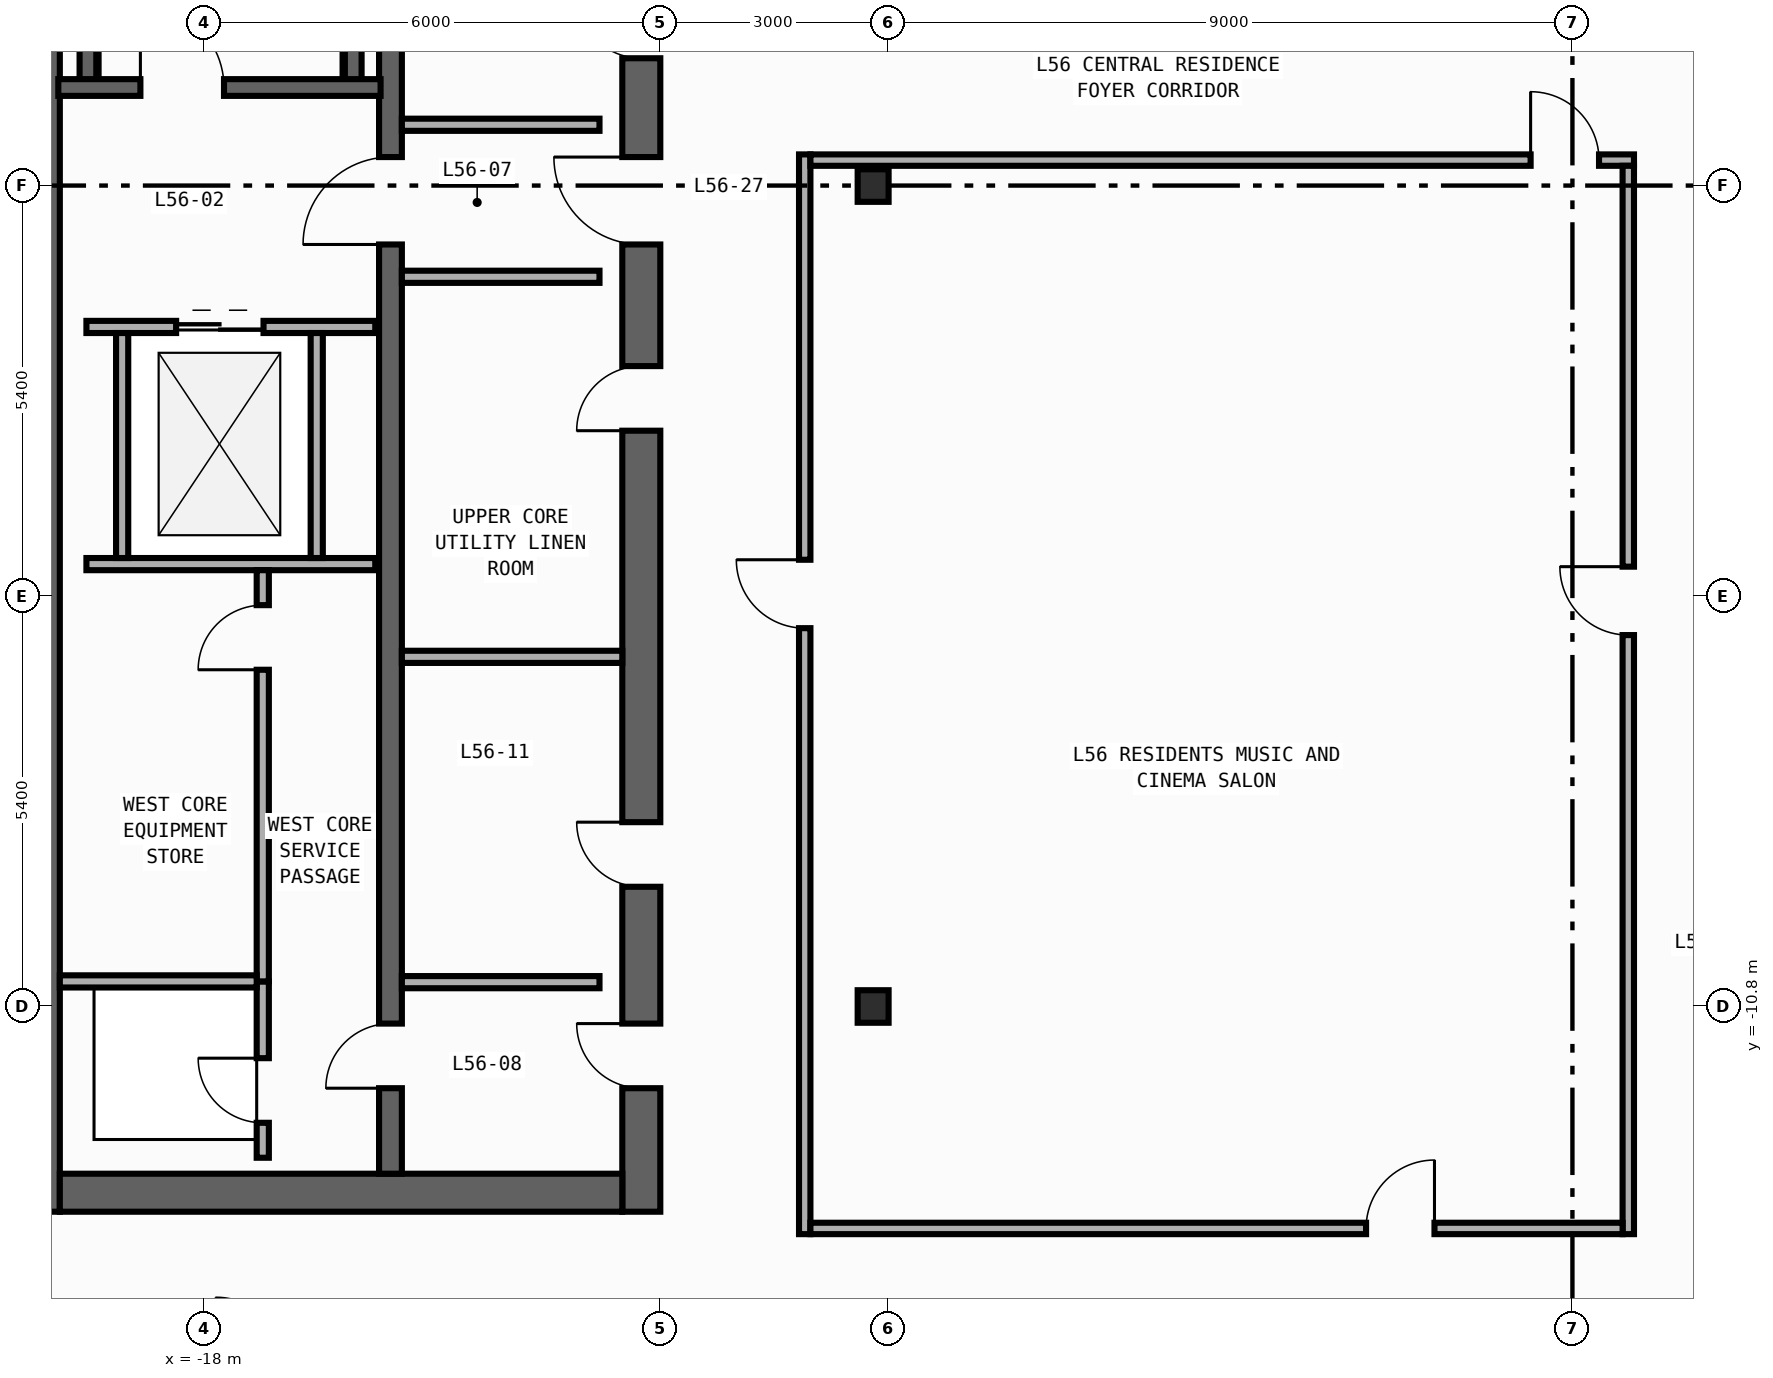
"""IFC4 building model, lengths in metres.
Left out: names, types, materials, properties, quantities, classifications, styles, units other than length and angle.
Written with IfcOpenShell. Run it as: python <this file> out.ifc"""

import sys

from ifc_helpers import new_model, si_unit, direction, frame, frame_2d, origin, origin_2d, place, context, subcontext, project, spatial, rectangle, i_section, extrude, element, fill, save


model = new_model("IFC4")
c1 = context("Model", 3, precision=1e-05, world=origin(), true_north=direction((0.0, 1.0)))
c2 = subcontext(c1, "Body", "Model", "MODEL_VIEW")
j1 = project(units=[si_unit("LENGTHUNIT", "METRE"), si_unit("PLANEANGLEUNIT", "RADIAN")], contexts=[c1])
p1 = place(None, origin())
s1 = spatial("IfcSite", under=j1, at=p1, CompositionType="ELEMENT")
p2 = place(p1, origin())
s2 = spatial("IfcBuilding", under=s1, at=p2, CompositionType="ELEMENT")
p3 = place(p2, frame((0.0, 0.0, 240.4)))
s3 = spatial("IfcBuildingStorey", under=s2, at=p3, CompositionType="ELEMENT", Elevation=240.4)
p4 = place(p3, frame((-20.15, -13.5, 0.0), z_axis=(0.0, 0.0, 1.0), x_axis=(0.0, 1.0, 0.0)))
e1 = element("IfcWall", 1, at=p4, inside=s3, PredefinedType="SHEAR", context=c2, shape_type="SweptSolid", body=[
    extrude(rectangle(XDim=27.0, YDim=0.5, at=frame_2d((13.5, 0.0))), origin(), (0.0, 0.0, 1.0), 3.34),
])
p5 = place(p3, frame((-12.25, -13.5, 0.0), z_axis=(0.0, 0.0, 1.0), x_axis=(0.0, 1.0, 0.0)))
e2 = element("IfcWall", 2, at=p5, inside=s3, PredefinedType="SHEAR", context=c2, shape_type="SweptSolid", body=[
    extrude(rectangle(XDim=27.0, YDim=0.5, at=frame_2d((13.5, 0.0))), origin(), (0.0, 0.0, 1.0), 3.34),
])
p6 = place(p5, frame((15.175, 0.0, 0.0)))
e3 = element("IfcOpeningElement", 3, at=p6, cuts=e2, PredefinedType="OPENING", context=c2, shape_type="SweptSolid", body=[
    extrude(rectangle(XDim=0.85, YDim=2.1, at=frame_2d((0.425, 1.05))), frame((0.0, 0.26, 0.0), z_axis=(0.0, -1.0, 0.0), x_axis=(1.0, 0.0, 0.0)), (0.0, 0.0, 1.0), 0.52),
])
p7 = place(p5, frame((21.275, 0.0, 0.0)))
e4 = element("IfcOpeningElement", 4, at=p7, cuts=e2, PredefinedType="OPENING", context=c2, shape_type="SweptSolid", body=[
    extrude(rectangle(XDim=0.85, YDim=2.1, at=frame_2d((0.425, 1.05))), frame((0.0, 0.26, 0.0), z_axis=(0.0, -1.0, 0.0), x_axis=(1.0, 0.0, 0.0)), (0.0, 0.0, 1.0), 0.52),
])
p8 = place(p5, frame((4.275, 0.0, 0.0)))
e5 = element("IfcOpeningElement", 5, at=p8, cuts=e2, PredefinedType="OPENING", context=c2, shape_type="SweptSolid", body=[
    extrude(rectangle(XDim=0.85, YDim=2.1, at=frame_2d((0.425, 1.05))), frame((0.0, 0.26, 0.0), z_axis=(0.0, -1.0, 0.0), x_axis=(1.0, 0.0, 0.0)), (0.0, 0.0, 1.0), 0.52),
])
p9 = place(p5, frame((10.275, 0.0, 0.0)))
e6 = element("IfcOpeningElement", 6, at=p9, cuts=e2, PredefinedType="OPENING", context=c2, shape_type="SweptSolid", body=[
    extrude(rectangle(XDim=0.85, YDim=2.1, at=frame_2d((0.425, 1.05))), frame((0.0, 0.26, 0.0), z_axis=(0.0, -1.0, 0.0), x_axis=(1.0, 0.0, 0.0)), (0.0, 0.0, 1.0), 0.52),
])
p10 = place(p5, frame((12.725, 0.0, 0.0)))
e7 = element("IfcOpeningElement", 7, at=p10, cuts=e2, PredefinedType="OPENING", context=c2, shape_type="SweptSolid", body=[
    extrude(rectangle(XDim=1.15, YDim=2.2, at=frame_2d((0.575, 1.1))), frame((0.0, 0.26, 0.0), z_axis=(0.0, -1.0, 0.0), x_axis=(1.0, 0.0, 0.0)), (0.0, 0.0, 1.0), 0.52),
])
p11 = place(p5, frame((1.625, 0.0, 0.0)))
e8 = element("IfcOpeningElement", 8, at=p11, cuts=e2, PredefinedType="OPENING", context=c2, shape_type="SweptSolid", body=[
    extrude(rectangle(XDim=0.85, YDim=2.1, at=frame_2d((0.425, 1.05))), frame((0.0, 0.26, 0.0), z_axis=(0.0, -1.0, 0.0), x_axis=(1.0, 0.0, 0.0)), (0.0, 0.0, 1.0), 0.52),
])
p12 = place(p3, frame((-19.9, -13.25, 0.0), z_axis=(0.0, 0.0, 1.0), x_axis=(1.0, 0.0, 0.0)))
e9 = element("IfcWall", 9, at=p12, inside=s3, PredefinedType="SHEAR", context=c2, shape_type="SweptSolid", body=[
    extrude(rectangle(XDim=7.4, YDim=0.5, at=frame_2d((3.7, 0.0))), origin(), (0.0, 0.0, 1.0), 3.34),
])
p13 = place(p3, frame((-15.55, -13.0, 0.0), z_axis=(0.0, 0.0, 1.0), x_axis=(0.0, 1.0, 0.0)))
e10 = element("IfcWall", 10, at=p13, inside=s3, PredefinedType="SHEAR", context=c2, shape_type="SweptSolid", body=[
    extrude(rectangle(XDim=26.0, YDim=0.3, at=frame_2d((13.0, 0.0))), origin(), (0.0, 0.0, 1.0), 3.34),
])
p14 = place(p13, frame((12.225, 0.0, 0.0)))
e11 = element("IfcOpeningElement", 11, at=p14, cuts=e10, PredefinedType="OPENING", context=c2, shape_type="SweptSolid", body=[
    extrude(rectangle(XDim=1.15, YDim=2.2, at=frame_2d((0.575, 1.1))), frame((0.0, 0.16, 0.0), z_axis=(0.0, -1.0, 0.0), x_axis=(1.0, 0.0, 0.0)), (0.0, 0.0, 1.0), 0.32),
])
p15 = place(p13, frame((1.125, 0.0, 0.0)))
e12 = element("IfcOpeningElement", 12, at=p15, cuts=e10, PredefinedType="OPENING", context=c2, shape_type="SweptSolid", body=[
    extrude(rectangle(XDim=0.85, YDim=2.1, at=frame_2d((0.425, 1.05))), frame((0.0, 0.16, 0.0), z_axis=(0.0, -1.0, 0.0), x_axis=(1.0, 0.0, 0.0)), (0.0, 0.0, 1.0), 0.32),
])
for number, where, z_axis, x_axis in (
    (13, (-16.04, 1.29, 0.0), (0.0, 0.0, 1.0), (0.0, 1.0, 0.0)),
    (14, (-19.53, 1.29, 0.0), (0.0, 0.0, 1.0), (0.0, 1.0, 0.0)),
):
    element("IfcWall", number, at=place(p3, frame(where, z_axis=z_axis, x_axis=x_axis)), inside=s3, PredefinedType="SHEAR", context=c2, shape_type="SweptSolid", body=[
        extrude(rectangle(XDim=11.42, YDim=0.22, at=frame_2d((5.71, 0.0))), origin(), (0.0, 0.0, 1.0), 3.34),
    ])
p16 = place(p3, frame((-19.92, 1.29, 0.0), z_axis=(0.0, 0.0, 1.0), x_axis=(1.0, 0.0, 0.0)))
e15 = element("IfcWall", 15, at=p16, inside=s3, PredefinedType="SHEAR", context=c2, shape_type="SweptSolid", body=[
    extrude(rectangle(XDim=4.24, YDim=0.22, at=frame_2d((2.12, 0.0))), origin(), (0.0, 0.0, 1.0), 3.34),
])
p17 = place(p16, frame((1.08, 0.0, 0.0)))
e16 = element("IfcOpeningElement", 16, at=p17, cuts=e15, PredefinedType="OPENING", context=c2, shape_type="SweptSolid", body=[
    extrude(rectangle(XDim=1.1, YDim=2.2, at=frame_2d((0.55, 1.1))), frame((0.0, 0.12, 0.0), z_axis=(0.0, -1.0, 0.0), x_axis=(1.0, 0.0, 0.0)), (0.0, 0.0, 1.0), 0.24),
])
for number, where, z_axis, x_axis in (
    (17, (-9.2, -10.8, 0.0), (0.0, 0.0, 1.0), (1.0, 0.0, 0.0)),
    (18, (-9.2, 0.0, 0.0), (0.0, 0.0, 1.0), (1.0, 0.0, 0.0)),
):
    element("IfcColumn", number, at=place(p3, frame(where, z_axis=z_axis, x_axis=x_axis)), inside=s3, PredefinedType="COLUMN", context=c2, shape_type="SweptSolid", body=[
        extrude(i_section(OverallWidth=0.407, OverallDepth=0.428, WebThickness=0.02, FlangeThickness=0.035, FilletRadius=0.022, at=origin_2d()), origin(), (0.0, 0.0, 1.0), 3.6),
    ])
p18 = place(p3, frame((-19.55, -1.86, 0.0), z_axis=(0.0, 0.0, 1.0), x_axis=(1.0, 0.0, 0.0)))
e19 = element("IfcWall", 19, at=p18, inside=s3, PredefinedType="STANDARD", context=c2, shape_type="SweptSolid", body=[
    extrude(rectangle(XDim=3.8, YDim=0.16, at=frame_2d((1.9, 0.0))), origin(), (0.0, 0.0, 1.0), 3.34),
])
p19 = place(p18, frame((1.18, 0.0, 0.0)))
e20 = element("IfcOpeningElement", 20, at=p19, cuts=e19, PredefinedType="OPENING", context=c2, shape_type="SweptSolid", body=[
    extrude(rectangle(XDim=1.15, YDim=2.2, at=frame_2d((0.575, 1.1))), frame((0.0, 0.09, 0.0), z_axis=(0.0, -1.0, 0.0), x_axis=(1.0, 0.0, 0.0)), (0.0, 0.0, 1.0), 0.18),
])
p20 = place(p3, frame((-19.55, -4.98, 0.0), z_axis=(0.0, 0.0, 1.0), x_axis=(1.0, 0.0, 0.0)))
e21 = element("IfcWall", 21, at=p20, inside=s3, PredefinedType="STANDARD", context=c2, shape_type="SweptSolid", body=[
    extrude(rectangle(XDim=3.8, YDim=0.16, at=frame_2d((1.9, 0.0))), origin(), (0.0, 0.0, 1.0), 3.34),
])
for number, where, z_axis, x_axis in (
    (22, (-19.08, -4.9, 0.0), (0.0, 0.0, 1.0), (0.0, 1.0, 0.0)),
    (23, (-16.52, -4.9, 0.0), (0.0, 0.0, 1.0), (0.0, 1.0, 0.0)),
):
    element("IfcWall", number, at=place(p3, frame(where, z_axis=z_axis, x_axis=x_axis)), inside=s3, PredefinedType="STANDARD", context=c2, shape_type="SweptSolid", body=[
        extrude(rectangle(XDim=2.96, YDim=0.16, at=frame_2d((1.48, 0.0))), origin(), (0.0, 0.0, 1.0), 3.34),
    ])
for number, where, z_axis, x_axis in (
    (24, (-15.4, 0.8, 0.0), (0.0, 0.0, 1.0), (1.0, 0.0, 0.0)),
    (25, (-15.4, -1.2, 0.0), (0.0, 0.0, 1.0), (1.0, 0.0, 0.0)),
    (26, (-15.4, -10.48, 0.0), (0.0, 0.0, 1.0), (1.0, 0.0, 0.0)),
):
    element("IfcWall", number, at=place(p3, frame(where, z_axis=z_axis, x_axis=x_axis)), inside=s3, PredefinedType="STANDARD", context=c2, shape_type="SweptSolid", body=[
        extrude(rectangle(XDim=2.6, YDim=0.16, at=frame_2d((1.3, 0.0))), origin(), (0.0, 0.0, 1.0), 3.34),
    ])
p21 = place(p3, frame((-17.23, -12.79, 0.0), z_axis=(0.0, 0.0, 1.0), x_axis=(0.0, 1.0, 0.0)))
e27 = element("IfcWall", 27, at=p21, inside=s3, PredefinedType="PARTITIONING", context=c2, shape_type="SweptSolid", body=[
    extrude(rectangle(XDim=2.32, YDim=0.16, at=frame_2d((1.16, 0.0))), origin(), (0.0, 0.0, 1.0), 3.34),
])
p22 = place(p21, frame((0.46, 0.0, 0.0)))
e28 = element("IfcOpeningElement", 28, at=p22, cuts=e27, PredefinedType="OPENING", context=c2, shape_type="SweptSolid", body=[
    extrude(rectangle(XDim=0.85, YDim=2.1, at=frame_2d((0.425, 1.05))), frame((0.0, 0.09, 0.0), z_axis=(0.0, -1.0, 0.0), x_axis=(1.0, 0.0, 0.0)), (0.0, 0.0, 1.0), 0.18),
])
p23 = place(p3, frame((-17.23, -10.47, 0.0), z_axis=(0.0, 0.0, 1.0), x_axis=(0.0, 1.0, 0.0)))
e29 = element("IfcWall", 29, at=p23, inside=s3, PredefinedType="PARTITIONING", context=c2, shape_type="SweptSolid", body=[
    extrude(rectangle(XDim=5.41, YDim=0.16, at=frame_2d((2.705, 0.0))), origin(), (0.0, 0.0, 1.0), 3.34),
])
p24 = place(p23, frame((4.1, 0.0, 0.0)))
e30 = element("IfcOpeningElement", 30, at=p24, cuts=e29, PredefinedType="OPENING", context=c2, shape_type="SweptSolid", body=[
    extrude(rectangle(XDim=0.85, YDim=2.1, at=frame_2d((0.425, 1.05))), frame((0.0, 0.09, 0.0), z_axis=(0.0, -1.0, 0.0), x_axis=(1.0, 0.0, 0.0)), (0.0, 0.0, 1.0), 0.18),
])
p25 = place(p3, frame((-19.9, -10.47, 0.0), z_axis=(0.0, 0.0, 1.0), x_axis=(1.0, 0.0, 0.0)))
e31 = element("IfcWall", 31, at=p25, inside=s3, PredefinedType="PARTITIONING", context=c2, shape_type="SweptSolid", body=[
    extrude(rectangle(XDim=2.59, YDim=0.16, at=frame_2d((1.295, 0.0))), origin(), (0.0, 0.0, 1.0), 3.34),
])
p26 = place(p3, frame((-15.4, -6.2, 0.0), z_axis=(0.0, 0.0, 1.0), x_axis=(1.0, 0.0, 0.0)))
e32 = element("IfcWall", 32, at=p26, inside=s3, PredefinedType="PARTITIONING", context=c2, shape_type="SweptSolid", body=[
    extrude(rectangle(XDim=2.9, YDim=0.16, at=frame_2d((1.45, 0.0))), origin(), (0.0, 0.0, 1.0), 3.34),
])
p27 = place(p3, frame((-10.1, -13.795, 0.0), z_axis=(0.0, 0.0, 1.0), x_axis=(0.0, 1.0, 0.0)))
e33 = element("IfcWall", 33, at=p27, inside=s3, PredefinedType="PARTITIONING", context=c2, shape_type="SweptSolid", body=[
    extrude(rectangle(XDim=14.205, YDim=0.15, at=frame_2d((7.103, 0.0))), origin(), (0.0, 0.0, 1.0), 3.34),
])
p28 = place(p27, frame((7.972, 0.0, 0.0)))
e34 = element("IfcOpeningElement", 34, at=p28, cuts=e33, PredefinedType="OPENING", context=c2, shape_type="SweptSolid", body=[
    extrude(rectangle(XDim=0.9, YDim=2.15, at=frame_2d((0.45, 1.075))), frame((0.0, 0.085, 0.0), z_axis=(0.0, -1.0, 0.0), x_axis=(1.0, 0.0, 0.0)), (0.0, 0.0, 1.0), 0.17),
])
p29 = place(p3, frame((-10.025, 0.335, 0.0), z_axis=(0.0, 0.0, 1.0), x_axis=(1.0, 0.0, 0.0)))
e35 = element("IfcWall", 35, at=p29, inside=s3, PredefinedType="PARTITIONING", context=c2, shape_type="SweptSolid", body=[
    extrude(rectangle(XDim=10.835, YDim=0.15, at=frame_2d((5.417, 0.0))), origin(), (0.0, 0.0, 1.0), 2.44),
])
p30 = place(p29, frame((9.475, 0.0, 0.0)))
e36 = element("IfcOpeningElement", 36, at=p30, cuts=e35, PredefinedType="OPENING", context=c2, shape_type="SweptSolid", body=[
    extrude(rectangle(XDim=0.9, YDim=2.15, at=frame_2d((0.45, 1.075))), frame((0.0, 0.085, 0.0), z_axis=(0.0, -1.0, 0.0), x_axis=(1.0, 0.0, 0.0)), (0.0, 0.0, 1.0), 0.17),
])
p31 = place(p3, frame((0.735, -13.795, 0.0), z_axis=(0.0, 0.0, 1.0), x_axis=(0.0, 1.0, 0.0)))
e37 = element("IfcWall", 37, at=p31, inside=s3, PredefinedType="PARTITIONING", context=c2, shape_type="SweptSolid", body=[
    extrude(rectangle(XDim=14.055, YDim=0.15, at=frame_2d((7.027, 0.0))), origin(), (0.0, 0.0, 1.0), 3.34),
])
p32 = place(p31, frame((7.881, 0.0, 0.0)))
e38 = element("IfcOpeningElement", 38, at=p32, cuts=e37, PredefinedType="OPENING", context=c2, shape_type="SweptSolid", body=[
    extrude(rectangle(XDim=0.9, YDim=2.15, at=frame_2d((0.45, 1.075))), frame((0.0, 0.085, 0.0), z_axis=(0.0, -1.0, 0.0), x_axis=(1.0, 0.0, 0.0)), (0.0, 0.0, 1.0), 0.17),
])
p33 = place(p3, frame((-10.025, -13.72, 0.0), z_axis=(0.0, 0.0, 1.0), x_axis=(1.0, 0.0, 0.0)))
e39 = element("IfcWall", 39, at=p33, inside=s3, PredefinedType="PARTITIONING", context=c2, shape_type="SweptSolid", body=[
    extrude(rectangle(XDim=10.685, YDim=0.15, at=frame_2d((5.342, 0.0))), origin(), (0.0, 0.0, 1.0), 3.34),
])
p34 = place(p33, frame((7.31, 0.0, 0.0)))
e40 = element("IfcOpeningElement", 40, at=p34, cuts=e39, PredefinedType="OPENING", context=c2, shape_type="SweptSolid", body=[
    extrude(rectangle(XDim=0.9, YDim=2.15, at=frame_2d((0.45, 1.075))), frame((0.0, 0.085, 0.0), z_axis=(0.0, -1.0, 0.0), x_axis=(1.0, 0.0, 0.0)), (0.0, 0.0, 1.0), 0.17),
])
p35 = place(p17, origin())
e41 = element("IfcDoor", 41, at=p35, inside=s3, OperationType="SINGLE_SWING_LEFT", PredefinedType="DOOR", context=c2, shape_type="SweptSolid", body=[
    extrude(rectangle(XDim=1.1, YDim=2.2, at=frame_2d((0.55, 1.1))), frame((0.0, 0.025, 0.0), z_axis=(0.0, -1.0, 0.0), x_axis=(1.0, 0.0, 0.0)), (0.0, 0.0, 1.0), 0.05),
])
fill(e16, e41)
p36 = place(p6, origin())
e42 = element("IfcDoor", 42, at=p36, inside=s3, OperationType="SINGLE_SWING_RIGHT", PredefinedType="DOOR", context=c2, shape_type="SweptSolid", body=[
    extrude(rectangle(XDim=0.85, YDim=2.1, at=frame_2d((0.425, 1.05))), frame((0.0, 0.025, 0.0), z_axis=(0.0, -1.0, 0.0), x_axis=(1.0, 0.0, 0.0)), (0.0, 0.0, 1.0), 0.05),
])
fill(e3, e42)
p37 = place(p8, origin())
e43 = element("IfcDoor", 43, at=p37, inside=s3, OperationType="SINGLE_SWING_RIGHT", PredefinedType="DOOR", context=c2, shape_type="SweptSolid", body=[
    extrude(rectangle(XDim=0.85, YDim=2.1, at=frame_2d((0.425, 1.05))), frame((0.0, 0.025, 0.0), z_axis=(0.0, -1.0, 0.0), x_axis=(1.0, 0.0, 0.0)), (0.0, 0.0, 1.0), 0.05),
])
fill(e5, e43)
p38 = place(p9, origin())
e44 = element("IfcDoor", 44, at=p38, inside=s3, OperationType="SINGLE_SWING_LEFT", PredefinedType="DOOR", context=c2, shape_type="SweptSolid", body=[
    extrude(rectangle(XDim=0.85, YDim=2.1, at=frame_2d((0.425, 1.05))), frame((0.0, 0.025, 0.0), z_axis=(0.0, -1.0, 0.0), x_axis=(1.0, 0.0, 0.0)), (0.0, 0.0, 1.0), 0.05),
])
fill(e6, e44)
p39 = place(p10, origin())
e45 = element("IfcDoor", 45, at=p39, inside=s3, OperationType="SINGLE_SWING_RIGHT", PredefinedType="DOOR", context=c2, shape_type="SweptSolid", body=[
    extrude(rectangle(XDim=1.15, YDim=2.2, at=frame_2d((0.575, 1.1))), frame((0.0, 0.025, 0.0), z_axis=(0.0, -1.0, 0.0), x_axis=(1.0, 0.0, 0.0)), (0.0, 0.0, 1.0), 0.05),
])
fill(e7, e45)
p40 = place(p14, origin())
e46 = element("IfcDoor", 46, at=p40, inside=s3, OperationType="SINGLE_SWING_LEFT", PredefinedType="DOOR", context=c2, shape_type="SweptSolid", body=[
    extrude(rectangle(XDim=1.15, YDim=2.2, at=frame_2d((0.575, 1.1))), frame((0.0, 0.025, 0.0), z_axis=(0.0, -1.0, 0.0), x_axis=(1.0, 0.0, 0.0)), (0.0, 0.0, 1.0), 0.05),
])
fill(e11, e46)
p41 = place(p11, origin())
e47 = element("IfcDoor", 47, at=p41, inside=s3, OperationType="SINGLE_SWING_RIGHT", PredefinedType="DOOR", context=c2, shape_type="SweptSolid", body=[
    extrude(rectangle(XDim=0.85, YDim=2.1, at=frame_2d((0.425, 1.05))), frame((0.0, 0.025, 0.0), z_axis=(0.0, -1.0, 0.0), x_axis=(1.0, 0.0, 0.0)), (0.0, 0.0, 1.0), 0.05),
])
fill(e8, e47)
p42 = place(p15, origin())
e48 = element("IfcDoor", 48, at=p42, inside=s3, OperationType="SINGLE_SWING_LEFT", PredefinedType="DOOR", context=c2, shape_type="SweptSolid", body=[
    extrude(rectangle(XDim=0.85, YDim=2.1, at=frame_2d((0.425, 1.05))), frame((0.0, 0.025, 0.0), z_axis=(0.0, -1.0, 0.0), x_axis=(1.0, 0.0, 0.0)), (0.0, 0.0, 1.0), 0.05),
])
fill(e12, e48)
p43 = place(p19, origin())
e49 = element("IfcDoor", 49, at=p43, inside=s3, OperationType="DOUBLE_DOOR_SLIDING", PredefinedType="DOOR", context=c2, shape_type="SweptSolid", body=[
    extrude(rectangle(XDim=1.15, YDim=2.2, at=frame_2d((0.575, 1.1))), frame((0.0, 0.025, 0.0), z_axis=(0.0, -1.0, 0.0), x_axis=(1.0, 0.0, 0.0)), (0.0, 0.0, 1.0), 0.05),
])
fill(e20, e49)
p44 = place(p22, origin())
e50 = element("IfcDoor", 50, at=p44, inside=s3, OperationType="SINGLE_SWING_RIGHT", PredefinedType="DOOR", context=c2, shape_type="SweptSolid", body=[
    extrude(rectangle(XDim=0.85, YDim=2.1, at=frame_2d((0.425, 1.05))), frame((0.0, 0.025, 0.0), z_axis=(0.0, -1.0, 0.0), x_axis=(1.0, 0.0, 0.0)), (0.0, 0.0, 1.0), 0.05),
])
fill(e28, e50)
p45 = place(p24, origin())
e51 = element("IfcDoor", 51, at=p45, inside=s3, OperationType="SINGLE_SWING_LEFT", PredefinedType="DOOR", context=c2, shape_type="SweptSolid", body=[
    extrude(rectangle(XDim=0.85, YDim=2.1, at=frame_2d((0.425, 1.05))), frame((0.0, 0.025, 0.0), z_axis=(0.0, -1.0, 0.0), x_axis=(1.0, 0.0, 0.0)), (0.0, 0.0, 1.0), 0.05),
])
fill(e30, e51)
p46 = place(p28, origin())
e52 = element("IfcDoor", 52, at=p46, inside=s3, OperationType="SINGLE_SWING_RIGHT", PredefinedType="DOOR", context=c2, shape_type="SweptSolid", body=[
    extrude(rectangle(XDim=0.9, YDim=2.15, at=frame_2d((0.45, 1.075))), frame((0.0, 0.025, 0.0), z_axis=(0.0, -1.0, 0.0), x_axis=(1.0, 0.0, 0.0)), (0.0, 0.0, 1.0), 0.05),
])
fill(e34, e52)
p47 = place(p30, origin())
e53 = element("IfcDoor", 53, at=p47, inside=s3, OperationType="SINGLE_SWING_LEFT", PredefinedType="DOOR", context=c2, shape_type="SweptSolid", body=[
    extrude(rectangle(XDim=0.9, YDim=2.15, at=frame_2d((0.45, 1.075))), frame((0.0, 0.025, 0.0), z_axis=(0.0, -1.0, 0.0), x_axis=(1.0, 0.0, 0.0)), (0.0, 0.0, 1.0), 0.05),
])
fill(e36, e53)
p48 = place(p32, origin())
e54 = element("IfcDoor", 54, at=p48, inside=s3, OperationType="SINGLE_SWING_RIGHT", PredefinedType="DOOR", context=c2, shape_type="SweptSolid", body=[
    extrude(rectangle(XDim=0.9, YDim=2.15, at=frame_2d((0.45, 1.075))), frame((0.0, 0.025, 0.0), z_axis=(0.0, -1.0, 0.0), x_axis=(1.0, 0.0, 0.0)), (0.0, 0.0, 1.0), 0.05),
])
fill(e38, e54)
p49 = place(p34, origin())
e55 = element("IfcDoor", 55, at=p49, inside=s3, OperationType="SINGLE_SWING_RIGHT", PredefinedType="DOOR", context=c2, shape_type="SweptSolid", body=[
    extrude(rectangle(XDim=0.9, YDim=2.15, at=frame_2d((0.45, 1.075))), frame((0.0, 0.025, 0.0), z_axis=(0.0, -1.0, 0.0), x_axis=(1.0, 0.0, 0.0)), (0.0, 0.0, 1.0), 0.05),
])
fill(e40, e55)
save(model, sys.argv[1])
